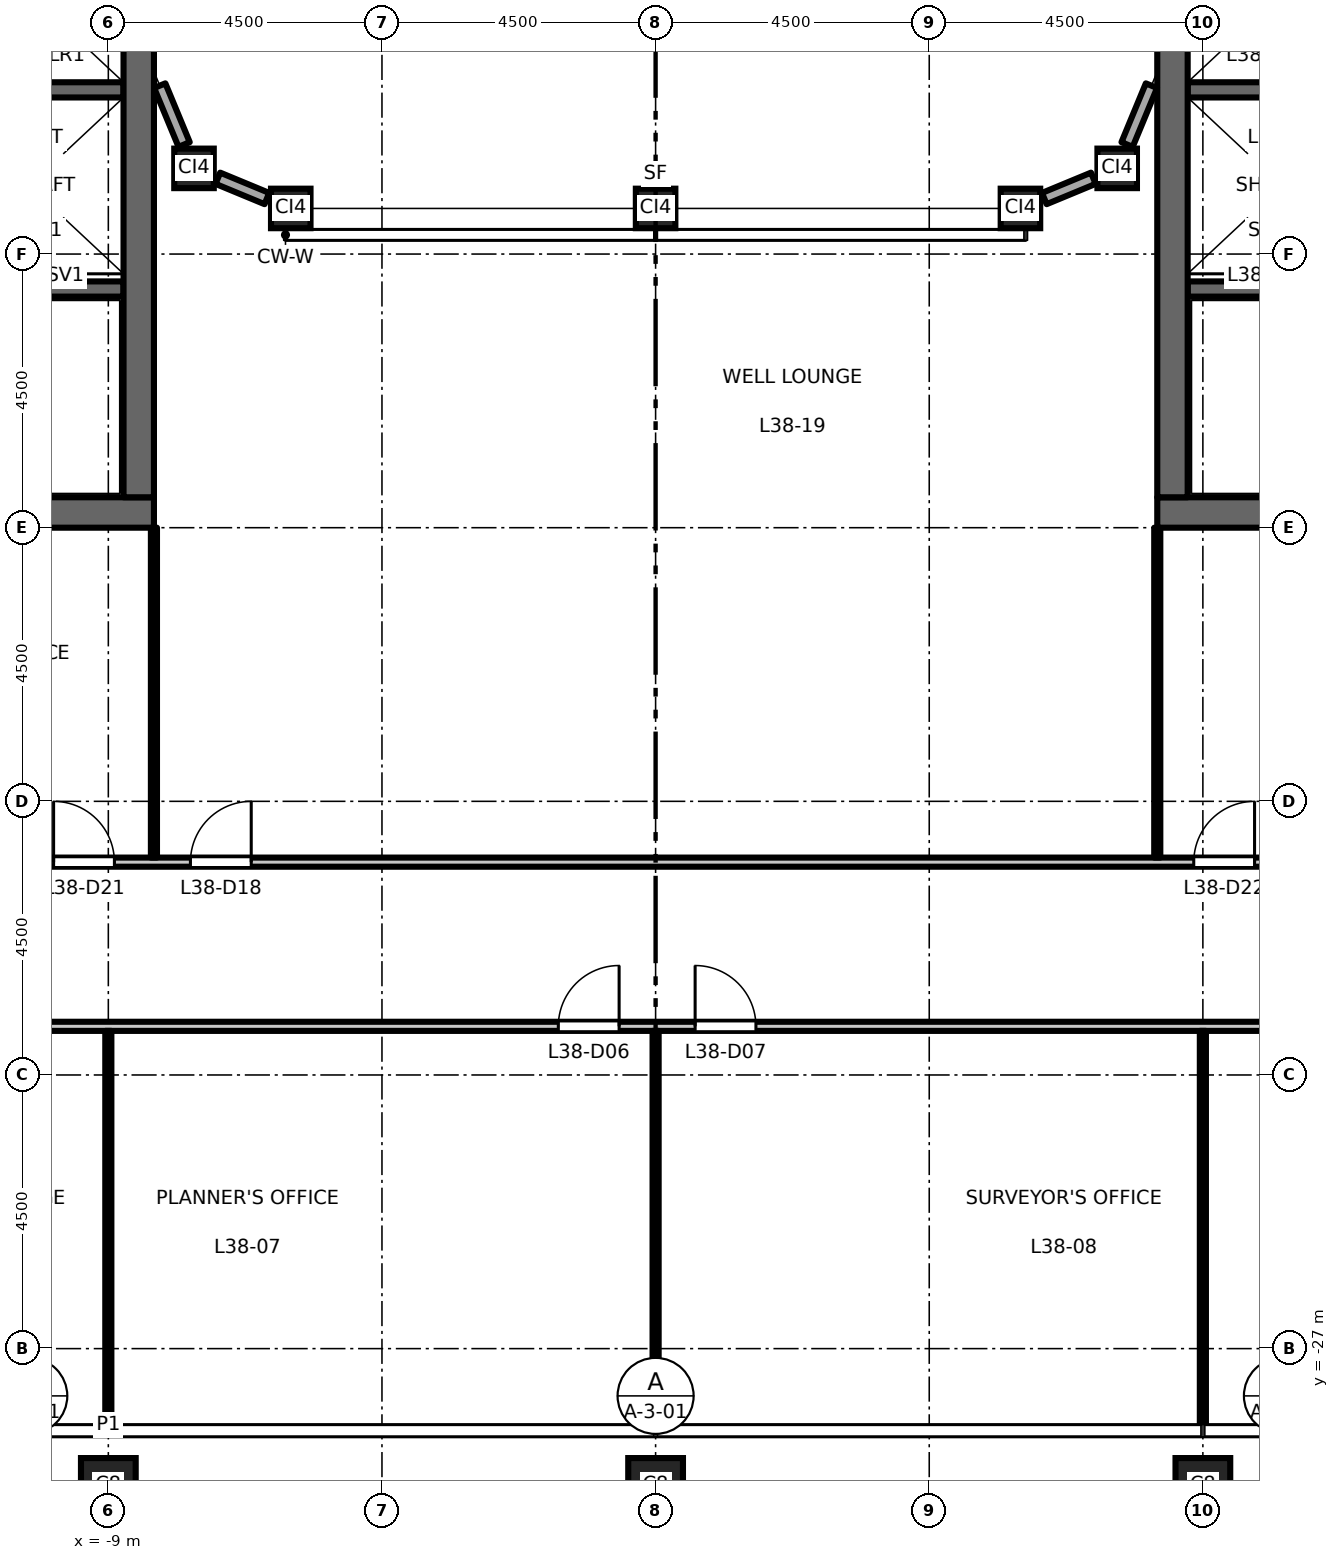
"""IFC4 building model, lengths in metres.
Left out: names, types, materials, properties, quantities, classifications, styles, units other than length and angle.
Written with IfcOpenShell. Run it as: python <this file> out.ifc"""

import sys

from ifc_helpers import new_model, si_unit, direction, frame, frame_2d, origin, origin_2d, place, context, subcontext, project, spatial, rectangle, hollow_rectangle, extrude, element, fill, save


model = new_model("IFC4")
c1 = context("Model", 3, precision=1e-05, world=origin(), true_north=direction((0.0, 1.0)))
c2 = subcontext(c1, "Body", "Model", "MODEL_VIEW")
j1 = project(units=[si_unit("LENGTHUNIT", "METRE"), si_unit("PLANEANGLEUNIT", "RADIAN")], contexts=[c1])
p1 = place(None, origin())
s1 = spatial("IfcSite", under=j1, at=p1, CompositionType="ELEMENT")
p2 = place(p1, origin())
s2 = spatial("IfcBuilding", under=s1, at=p2, CompositionType="ELEMENT")
p3 = place(p2, frame((0.0, 0.0, 176.7)))
s3 = spatial("IfcBuildingStorey", under=s2, at=p3, CompositionType="ELEMENT", Elevation=176.7)
for number, where, z_axis, x_axis in (
    (1, (-9.0, -29.25, 0.0), (0.0, 0.0, 1.0), (1.0, 0.0, 0.0)),
    (2, (0.0, -29.25, 0.0), (0.0, 0.0, 1.0), (1.0, 0.0, 0.0)),
    (3, (9.0, -29.25, 0.0), (0.0, 0.0, 1.0), (1.0, 0.0, 0.0)),
):
    element("IfcColumn", number, at=place(p3, frame(where, z_axis=z_axis, x_axis=x_axis)), inside=s3, PredefinedType="COLUMN", context=c2, shape_type="SweptSolid", body=[
        extrude(hollow_rectangle(XDim=0.9, YDim=0.9, WallThickness=0.05, at=origin_2d()), origin(), (0.0, 0.0, 1.0), 4.5),
    ])
for number, where, z_axis, x_axis in (
    (4, (-7.591, -7.591, 0.0), (0.0, 0.0, 1.0), (1.0, 0.0, 0.0)),
    (5, (-6.0, -8.25, 0.0), (0.0, 0.0, 1.0), (1.0, 0.0, 0.0)),
    (6, (0.0, -8.25, 0.0), (0.0, 0.0, 1.0), (1.0, 0.0, 0.0)),
    (7, (6.0, -8.25, 0.0), (0.0, 0.0, 1.0), (1.0, 0.0, 0.0)),
    (8, (7.591, -7.591, 0.0), (0.0, 0.0, 1.0), (1.0, 0.0, 0.0)),
):
    element("IfcColumn", number, at=place(p3, frame(where, z_axis=z_axis, x_axis=x_axis)), inside=s3, PredefinedType="COLUMN", context=c2, shape_type="SweptSolid", body=[
        extrude(hollow_rectangle(XDim=0.65, YDim=0.65, WallThickness=0.036, at=origin_2d()), origin(), (0.0, 0.0, 1.0), 4.5),
    ])
p4 = place(p3, frame((-8.75, -6.3, 0.0), z_axis=(0.0, 0.0, 1.0), x_axis=(-1.0, 0.0, 0.0)))
e9 = element("IfcWall", 9, at=p4, inside=s3, PredefinedType="SHEAR", context=c2, shape_type="SweptSolid", body=[
    extrude(rectangle(XDim=3.1, YDim=0.25, at=frame_2d((1.55, 0.0))), origin(), (0.0, 0.0, 1.0), 4.3),
])
p5 = place(p3, frame((-8.75, -9.575, 0.0), z_axis=(0.0, 0.0, 1.0), x_axis=(-1.0, 0.0, 0.0)))
e10 = element("IfcWall", 10, at=p5, inside=s3, PredefinedType="SHEAR", context=c2, shape_type="SweptSolid", body=[
    extrude(rectangle(XDim=8.0, YDim=0.25, at=frame_2d((4.0, 0.0))), origin(), (0.0, 0.0, 1.0), 4.3),
])
p6 = place(p5, frame((6.65, 0.0, 0.0)))
e11 = element("IfcOpeningElement", 11, at=p6, cuts=e10, PredefinedType="OPENING", context=c2, shape_type="SweptSolid", body=[
    extrude(rectangle(XDim=1.1, YDim=2.1, at=frame_2d((0.55, 1.05))), frame((0.0, 0.135, 0.0), z_axis=(0.0, -1.0, 0.0), x_axis=(1.0, 0.0, 0.0)), (0.0, 0.0, 1.0), 0.27),
])
p7 = place(p3, frame((-8.25, -13.25, 0.0), z_axis=(0.0, 0.0, 1.0), x_axis=(-1.0, 0.0, 0.0)))
e12 = element("IfcWall", 12, at=p7, inside=s3, PredefinedType="SHEAR", context=c2, shape_type="SweptSolid", body=[
    extrude(rectangle(XDim=13.5, YDim=0.5, at=frame_2d((6.75, 0.0))), origin(), (0.0, 0.0, 1.0), 4.3),
])
p8 = place(p3, frame((-8.5, -13.0, 0.0), z_axis=(0.0, 0.0, 1.0), x_axis=(0.0, 1.0, 0.0)))
e13 = element("IfcWall", 13, at=p8, inside=s3, PredefinedType="SHEAR", context=c2, shape_type="SweptSolid", body=[
    extrude(rectangle(XDim=26.0, YDim=0.5, at=frame_2d((13.0, 0.0))), origin(), (0.0, 0.0, 1.0), 4.3),
])
p9 = place(p3, frame((8.75, -6.3, 0.0), z_axis=(0.0, 0.0, 1.0), x_axis=(1.0, 0.0, 0.0)))
e14 = element("IfcWall", 14, at=p9, inside=s3, PredefinedType="SHEAR", context=c2, shape_type="SweptSolid", body=[
    extrude(rectangle(XDim=3.1, YDim=0.25, at=frame_2d((1.55, 0.0))), origin(), (0.0, 0.0, 1.0), 4.3),
])
p10 = place(p3, frame((8.75, -9.575, 0.0), z_axis=(0.0, 0.0, 1.0), x_axis=(1.0, 0.0, 0.0)))
e15 = element("IfcWall", 15, at=p10, inside=s3, PredefinedType="SHEAR", context=c2, shape_type="SweptSolid", body=[
    extrude(rectangle(XDim=8.0, YDim=0.25, at=frame_2d((4.0, 0.0))), origin(), (0.0, 0.0, 1.0), 4.3),
])
p11 = place(p10, frame((6.65, 0.0, 0.0)))
e16 = element("IfcOpeningElement", 16, at=p11, cuts=e15, PredefinedType="OPENING", context=c2, shape_type="SweptSolid", body=[
    extrude(rectangle(XDim=1.1, YDim=2.1, at=frame_2d((0.55, 1.05))), frame((0.0, 0.135, 0.0), z_axis=(0.0, -1.0, 0.0), x_axis=(1.0, 0.0, 0.0)), (0.0, 0.0, 1.0), 0.27),
])
p12 = place(p3, frame((8.25, -13.25, 0.0), z_axis=(0.0, 0.0, 1.0), x_axis=(1.0, 0.0, 0.0)))
e17 = element("IfcWall", 17, at=p12, inside=s3, PredefinedType="SHEAR", context=c2, shape_type="SweptSolid", body=[
    extrude(rectangle(XDim=13.5, YDim=0.5, at=frame_2d((6.75, 0.0))), origin(), (0.0, 0.0, 1.0), 4.3),
])
p13 = place(p3, frame((8.5, -13.0, 0.0), z_axis=(0.0, 0.0, 1.0), x_axis=(0.0, 1.0, 0.0)))
e18 = element("IfcWall", 18, at=p13, inside=s3, PredefinedType="SHEAR", context=c2, shape_type="SweptSolid", body=[
    extrude(rectangle(XDim=26.0, YDim=0.5, at=frame_2d((13.0, 0.0))), origin(), (0.0, 0.0, 1.0), 4.3),
])
p14 = place(p3, frame((6.392, -8.087, 0.0), z_axis=(0.0, 0.0, 1.0), x_axis=(0.923894108428, 0.382648241093, 0.0)))
e19 = element("IfcWall", 19, at=p14, inside=s3, PredefinedType="STANDARD", context=c2, shape_type="SweptSolid", body=[
    extrude(rectangle(XDim=0.873, YDim=0.2, at=frame_2d((0.437, 0.0))), origin(), (0.0, 0.0, 1.0), 3.776),
])
for number, where, z_axis, x_axis in (
    (20, (7.753, -7.199, 0.0), (0.0, 0.0, 1.0), (0.383, 0.924, 0.0)),
    (21, (-8.154, -6.231, 0.0), (0.0, 0.0, 1.0), (0.383, -0.924, 0.0)),
):
    element("IfcWall", number, at=place(p3, frame(where, z_axis=z_axis, x_axis=x_axis)), inside=s3, PredefinedType="STANDARD", context=c2, shape_type="SweptSolid", body=[
        extrude(rectangle(XDim=1.048, YDim=0.2, at=frame_2d((0.524, 0.0))), origin(), (0.0, 0.0, 1.0), 3.776),
    ])
p15 = place(p3, frame((-7.199, -7.753, 0.0), z_axis=(0.0, 0.0, 1.0), x_axis=(0.923894108428, -0.382648241093, 0.0)))
e22 = element("IfcWall", 22, at=p15, inside=s3, PredefinedType="STANDARD", context=c2, shape_type="SweptSolid", body=[
    extrude(rectangle(XDim=0.873, YDim=0.2, at=frame_2d((0.437, 0.0))), origin(), (0.0, 0.0, 1.0), 3.776),
])
p16 = place(p3, frame((-26.646, -21.7, 0.0), z_axis=(0.0, 0.0, 1.0), x_axis=(1.0, 0.0, 0.0)))
e23 = element("IfcWall", 23, at=p16, inside=s3, PredefinedType="PARTITIONING", context=c2, shape_type="SweptSolid", body=[
    extrude(rectangle(XDim=53.292, YDim=0.15, at=frame_2d((26.646, 0.0))), origin(), (0.0, 0.0, 1.0), 4.3),
])
p17 = place(p16, frame((9.296, 0.0, 0.0)))
e24 = element("IfcOpeningElement", 24, at=p17, cuts=e23, PredefinedType="OPENING", context=c2, shape_type="SweptSolid", body=[
    extrude(rectangle(XDim=1.0, YDim=2.1, at=frame_2d((0.5, 1.05))), frame((0.0, 0.085, 0.0), z_axis=(0.0, -1.0, 0.0), x_axis=(1.0, 0.0, 0.0)), (0.0, 0.0, 1.0), 0.17),
])
p18 = place(p16, frame((25.046, 0.0, 0.0)))
e25 = element("IfcOpeningElement", 25, at=p18, cuts=e23, PredefinedType="OPENING", context=c2, shape_type="SweptSolid", body=[
    extrude(rectangle(XDim=1.0, YDim=2.1, at=frame_2d((0.5, 1.05))), frame((0.0, 0.085, 0.0), z_axis=(0.0, -1.0, 0.0), x_axis=(1.0, 0.0, 0.0)), (0.0, 0.0, 1.0), 0.17),
])
p19 = place(p16, frame((27.296, 0.0, 0.0)))
e26 = element("IfcOpeningElement", 26, at=p19, cuts=e23, PredefinedType="OPENING", context=c2, shape_type="SweptSolid", body=[
    extrude(rectangle(XDim=1.0, YDim=2.1, at=frame_2d((0.5, 1.05))), frame((0.0, 0.085, 0.0), z_axis=(0.0, -1.0, 0.0), x_axis=(1.0, 0.0, 0.0)), (0.0, 0.0, 1.0), 0.17),
])
p20 = place(p16, frame((43.046, 0.0, 0.0)))
e27 = element("IfcOpeningElement", 27, at=p20, cuts=e23, PredefinedType="OPENING", context=c2, shape_type="SweptSolid", body=[
    extrude(rectangle(XDim=1.0, YDim=2.1, at=frame_2d((0.5, 1.05))), frame((0.0, 0.085, 0.0), z_axis=(0.0, -1.0, 0.0), x_axis=(1.0, 0.0, 0.0)), (0.0, 0.0, 1.0), 0.17),
])
p21 = place(p16, frame((0.65, 0.0, 0.0)))
e28 = element("IfcOpeningElement", 28, at=p21, cuts=e23, PredefinedType="OPENING", context=c2, shape_type="SweptSolid", body=[
    extrude(rectangle(XDim=1.0, YDim=2.1, at=frame_2d((0.5, 1.05))), frame((0.0, 0.085, 0.0), z_axis=(0.0, -1.0, 0.0), x_axis=(1.0, 0.0, 0.0)), (0.0, 0.0, 1.0), 0.17),
])
p22 = place(p16, frame((51.546, 0.0, 0.0)))
e29 = element("IfcOpeningElement", 29, at=p22, cuts=e23, PredefinedType="OPENING", context=c2, shape_type="SweptSolid", body=[
    extrude(rectangle(XDim=1.0, YDim=2.1, at=frame_2d((0.5, 1.05))), frame((0.0, 0.085, 0.0), z_axis=(0.0, -1.0, 0.0), x_axis=(1.0, 0.0, 0.0)), (0.0, 0.0, 1.0), 0.17),
])
p23 = place(p3, frame((-21.825, -19.0, 0.0), z_axis=(0.0, 0.0, 1.0), x_axis=(1.0, 0.0, 0.0)))
e30 = element("IfcWall", 30, at=p23, inside=s3, PredefinedType="PARTITIONING", context=c2, shape_type="SweptSolid", body=[
    extrude(rectangle(XDim=43.65, YDim=0.15, at=frame_2d((21.825, 0.0))), origin(), (0.0, 0.0, 1.0), 4.3),
])
p24 = place(p23, frame((14.175, 0.0, 0.0)))
e31 = element("IfcOpeningElement", 31, at=p24, cuts=e30, PredefinedType="OPENING", context=c2, shape_type="SweptSolid", body=[
    extrude(rectangle(XDim=1.0, YDim=2.1, at=frame_2d((0.5, 1.05))), frame((0.0, 0.085, 0.0), z_axis=(0.0, -1.0, 0.0), x_axis=(1.0, 0.0, 0.0)), (0.0, 0.0, 1.0), 0.17),
])
p25 = place(p23, frame((11.925, 0.0, 0.0)))
e32 = element("IfcOpeningElement", 32, at=p25, cuts=e30, PredefinedType="OPENING", context=c2, shape_type="SweptSolid", body=[
    extrude(rectangle(XDim=1.0, YDim=2.1, at=frame_2d((0.5, 1.05))), frame((0.0, 0.085, 0.0), z_axis=(0.0, -1.0, 0.0), x_axis=(1.0, 0.0, 0.0)), (0.0, 0.0, 1.0), 0.17),
])
p26 = place(p23, frame((30.675, 0.0, 0.0)))
e33 = element("IfcOpeningElement", 33, at=p26, cuts=e30, PredefinedType="OPENING", context=c2, shape_type="SweptSolid", body=[
    extrude(rectangle(XDim=1.0, YDim=2.1, at=frame_2d((0.5, 1.05))), frame((0.0, 0.085, 0.0), z_axis=(0.0, -1.0, 0.0), x_axis=(1.0, 0.0, 0.0)), (0.0, 0.0, 1.0), 0.17),
])
p27 = place(p3, frame((-9.0, -28.26, 0.0), z_axis=(0.0, 0.0, 1.0), x_axis=(0.0, 1.0, 0.0)))
e34 = element("IfcWall", 34, at=p27, inside=s3, PredefinedType="PARTITIONING", context=c2, shape_type="SweptSolid", body=[
    extrude(rectangle(XDim=6.485, YDim=0.1, at=frame_2d((3.243, 0.0))), origin(), (0.0, 0.0, 1.0), 3.4),
])
p28 = place(p3, frame((-8.25, -18.925, 0.0), z_axis=(0.0, 0.0, 1.0), x_axis=(0.0, 1.0, 0.0)))
e35 = element("IfcWall", 35, at=p28, inside=s3, PredefinedType="PARTITIONING", context=c2, shape_type="SweptSolid", body=[
    extrude(rectangle(XDim=5.425, YDim=0.1, at=frame_2d((2.712, 0.0))), origin(), (0.0, 0.0, 1.0), 4.3),
])
p29 = place(p3, frame((0.0, -28.26, 0.0), z_axis=(0.0, 0.0, 1.0), x_axis=(0.0, 1.0, 0.0)))
e36 = element("IfcWall", 36, at=p29, inside=s3, PredefinedType="PARTITIONING", context=c2, shape_type="SweptSolid", body=[
    extrude(rectangle(XDim=6.485, YDim=0.1, at=frame_2d((3.243, 0.0))), origin(), (0.0, 0.0, 1.0), 3.4),
])
p30 = place(p3, frame((8.25, -18.925, 0.0), z_axis=(0.0, 0.0, 1.0), x_axis=(0.0, 1.0, 0.0)))
e37 = element("IfcWall", 37, at=p30, inside=s3, PredefinedType="PARTITIONING", context=c2, shape_type="SweptSolid", body=[
    extrude(rectangle(XDim=5.425, YDim=0.1, at=frame_2d((2.712, 0.0))), origin(), (0.0, 0.0, 1.0), 4.3),
])
p31 = place(p3, frame((9.0, -28.26, 0.0), z_axis=(0.0, 0.0, 1.0), x_axis=(0.0, 1.0, 0.0)))
e38 = element("IfcWall", 38, at=p31, inside=s3, PredefinedType="PARTITIONING", context=c2, shape_type="SweptSolid", body=[
    extrude(rectangle(XDim=6.485, YDim=0.1, at=frame_2d((3.243, 0.0))), origin(), (0.0, 0.0, 1.0), 3.4),
])
p32 = place(p18, origin())
e39 = element("IfcDoor", 39, at=p32, inside=s3, OperationType="SINGLE_SWING_RIGHT", PredefinedType="DOOR", context=c2, shape_type="SweptSolid", body=[
    extrude(rectangle(XDim=1.0, YDim=2.1, at=frame_2d((0.5, 1.05))), frame((0.0, 0.025, 0.0), z_axis=(0.0, -1.0, 0.0), x_axis=(1.0, 0.0, 0.0)), (0.0, 0.0, 1.0), 0.05),
])
fill(e25, e39)
p33 = place(p19, origin())
e40 = element("IfcDoor", 40, at=p33, inside=s3, OperationType="SINGLE_SWING_LEFT", PredefinedType="DOOR", context=c2, shape_type="SweptSolid", body=[
    extrude(rectangle(XDim=1.0, YDim=2.1, at=frame_2d((0.5, 1.05))), frame((0.0, 0.025, 0.0), z_axis=(0.0, -1.0, 0.0), x_axis=(1.0, 0.0, 0.0)), (0.0, 0.0, 1.0), 0.05),
])
fill(e26, e40)
p34 = place(p24, origin())
e41 = element("IfcDoor", 41, at=p34, inside=s3, OperationType="SINGLE_SWING_RIGHT", PredefinedType="DOOR", context=c2, shape_type="SweptSolid", body=[
    extrude(rectangle(XDim=1.0, YDim=2.1, at=frame_2d((0.5, 1.05))), frame((0.0, 0.025, 0.0), z_axis=(0.0, -1.0, 0.0), x_axis=(1.0, 0.0, 0.0)), (0.0, 0.0, 1.0), 0.05),
])
fill(e31, e41)
p35 = place(p25, origin())
e42 = element("IfcDoor", 42, at=p35, inside=s3, OperationType="SINGLE_SWING_LEFT", PredefinedType="DOOR", context=c2, shape_type="SweptSolid", body=[
    extrude(rectangle(XDim=1.0, YDim=2.1, at=frame_2d((0.5, 1.05))), frame((0.0, 0.025, 0.0), z_axis=(0.0, -1.0, 0.0), x_axis=(1.0, 0.0, 0.0)), (0.0, 0.0, 1.0), 0.05),
])
fill(e32, e42)
p36 = place(p26, origin())
e43 = element("IfcDoor", 43, at=p36, inside=s3, OperationType="SINGLE_SWING_RIGHT", PredefinedType="DOOR", context=c2, shape_type="SweptSolid", body=[
    extrude(rectangle(XDim=1.0, YDim=2.1, at=frame_2d((0.5, 1.05))), frame((0.0, 0.025, 0.0), z_axis=(0.0, -1.0, 0.0), x_axis=(1.0, 0.0, 0.0)), (0.0, 0.0, 1.0), 0.05),
])
fill(e33, e43)
save(model, sys.argv[1])
